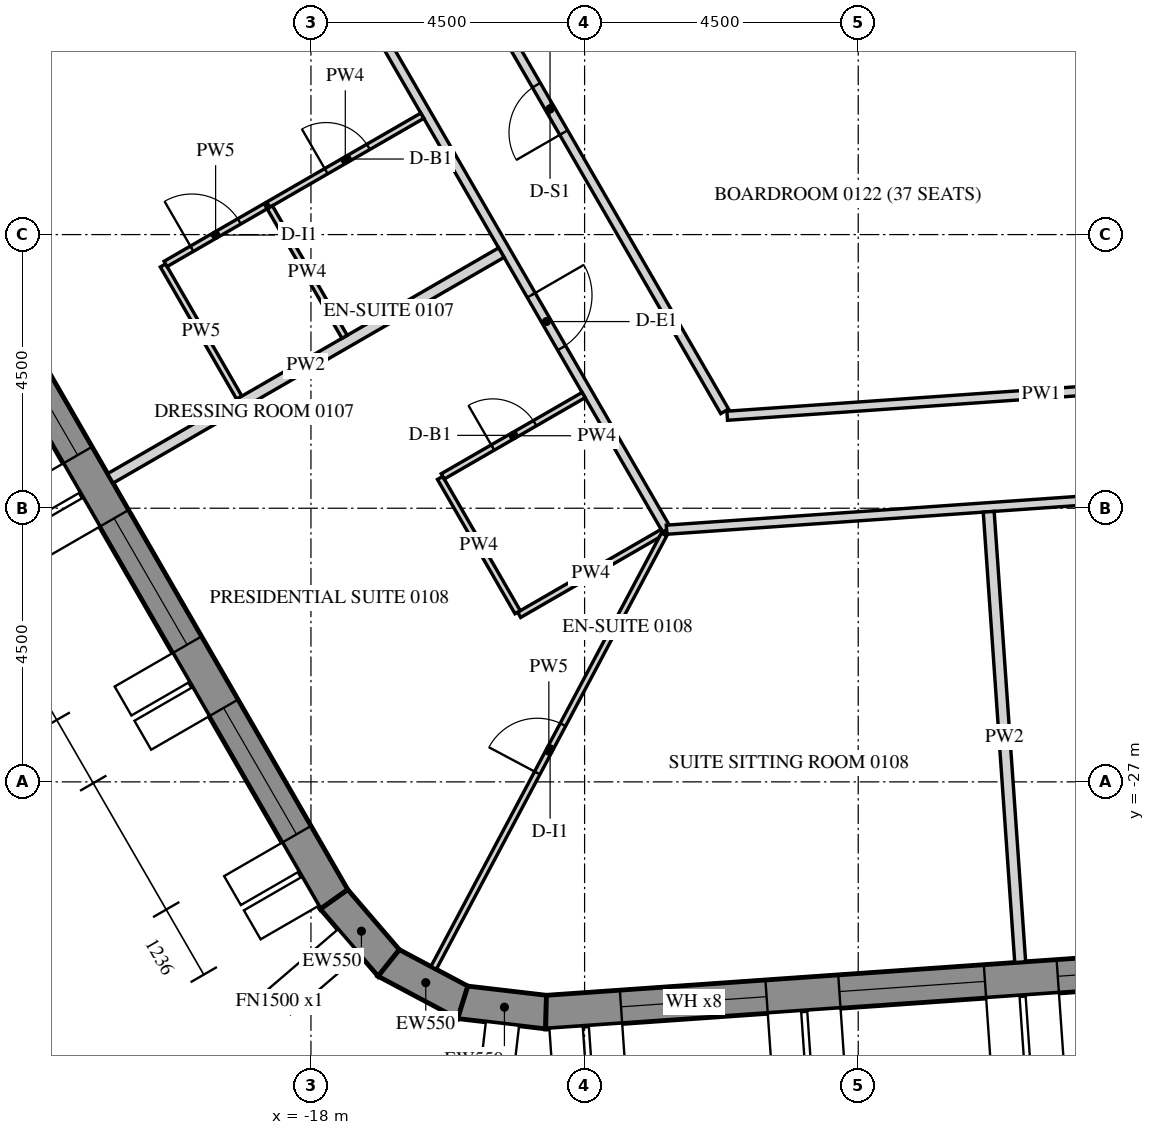
"""IFC4 building model, lengths in metres.
Left out: names, types, materials, properties, quantities, classifications, styles, units other than length and angle.
Written with IfcOpenShell. Run it as: python <this file> out.ifc"""

import sys

from ifc_helpers import new_model, si_unit, direction, frame, frame_2d, origin, place, context, subcontext, project, spatial, polyline, rectangle, outline, extrude, element, fill, save


model = new_model("IFC4")
c1 = context("Model", 3, precision=1e-05, world=origin(), true_north=direction((0.0, 1.0)))
c2 = subcontext(c1, "Body", "Model", "MODEL_VIEW")
j1 = project(units=[si_unit("LENGTHUNIT", "METRE"), si_unit("PLANEANGLEUNIT", "RADIAN")], contexts=[c1])
p1 = place(None, origin())
s1 = spatial("IfcSite", under=j1, at=p1, CompositionType="ELEMENT")
p2 = place(p1, origin())
s2 = spatial("IfcBuilding", under=s1, at=p2, CompositionType="ELEMENT")
p3 = place(p2, frame((0.0, 0.0, 37.5)))
s3 = spatial("IfcBuildingStorey", under=s2, at=p3, CompositionType="ELEMENT", Elevation=37.5)
p4 = place(p3, frame((-32.655, -2.89, -0.15), z_axis=(0.0, 0.0, 1.0), x_axis=(0.499997711317, -0.866026725152, 0.0)))
e1 = element("IfcWall", 1, at=p4, inside=s3, PredefinedType="SOLIDWALL", context=c2, shape_type="SweptSolid", body=[
    extrude(outline(polyline([(-0.022, -0.275), (30.097, -0.275), (30.045, 0.275), (0.022, 0.275), (-0.022, -0.275)])), origin(), (0.0, 0.0, 1.0), 3.9),
])
p5 = place(p4, frame((1.236, 0.0, 1.05)))
e2 = element("IfcOpeningElement", 2, at=p5, cuts=e1, PredefinedType="OPENING", context=c2, shape_type="SweptSolid", body=[
    extrude(rectangle(XDim=2.4, YDim=2.4, at=frame_2d((1.2, 1.2))), frame((0.0, 0.285, 0.0), z_axis=(0.0, -1.0, 0.0), x_axis=(1.0, 0.0, 0.0)), (0.0, 0.0, 1.0), 0.57),
])
p6 = place(p4, frame((4.835, 0.0, 1.05)))
e3 = element("IfcOpeningElement", 3, at=p6, cuts=e1, PredefinedType="OPENING", context=c2, shape_type="SweptSolid", body=[
    extrude(rectangle(XDim=2.4, YDim=2.4, at=frame_2d((1.2, 1.2))), frame((0.0, 0.285, 0.0), z_axis=(0.0, -1.0, 0.0), x_axis=(1.0, 0.0, 0.0)), (0.0, 0.0, 1.0), 0.57),
])
p7 = place(p4, frame((8.436, 0.0, 1.05)))
e4 = element("IfcOpeningElement", 4, at=p7, cuts=e1, PredefinedType="OPENING", context=c2, shape_type="SweptSolid", body=[
    extrude(rectangle(XDim=2.4, YDim=2.4, at=frame_2d((1.2, 1.2))), frame((0.0, 0.285, 0.0), z_axis=(0.0, -1.0, 0.0), x_axis=(1.0, 0.0, 0.0)), (0.0, 0.0, 1.0), 0.57),
])
p8 = place(p4, frame((12.035, 0.0, 1.05)))
e5 = element("IfcOpeningElement", 5, at=p8, cuts=e1, PredefinedType="OPENING", context=c2, shape_type="SweptSolid", body=[
    extrude(rectangle(XDim=2.4, YDim=2.4, at=frame_2d((1.2, 1.2))), frame((0.0, 0.285, 0.0), z_axis=(0.0, -1.0, 0.0), x_axis=(1.0, 0.0, 0.0)), (0.0, 0.0, 1.0), 0.57),
])
p9 = place(p4, frame((15.635, 0.0, 1.05)))
e6 = element("IfcOpeningElement", 6, at=p9, cuts=e1, PredefinedType="OPENING", context=c2, shape_type="SweptSolid", body=[
    extrude(rectangle(XDim=2.4, YDim=2.4, at=frame_2d((1.2, 1.2))), frame((0.0, 0.285, 0.0), z_axis=(0.0, -1.0, 0.0), x_axis=(1.0, 0.0, 0.0)), (0.0, 0.0, 1.0), 0.57),
])
p10 = place(p4, frame((19.236, 0.0, 1.05)))
e7 = element("IfcOpeningElement", 7, at=p10, cuts=e1, PredefinedType="OPENING", context=c2, shape_type="SweptSolid", body=[
    extrude(rectangle(XDim=2.4, YDim=2.4, at=frame_2d((1.2, 1.2))), frame((0.0, 0.285, 0.0), z_axis=(0.0, -1.0, 0.0), x_axis=(1.0, 0.0, 0.0)), (0.0, 0.0, 1.0), 0.57),
])
p11 = place(p4, frame((22.835, 0.0, 1.05)))
e8 = element("IfcOpeningElement", 8, at=p11, cuts=e1, PredefinedType="OPENING", context=c2, shape_type="SweptSolid", body=[
    extrude(rectangle(XDim=2.4, YDim=2.4, at=frame_2d((1.2, 1.2))), frame((0.0, 0.285, 0.0), z_axis=(0.0, -1.0, 0.0), x_axis=(1.0, 0.0, 0.0)), (0.0, 0.0, 1.0), 0.57),
])
p12 = place(p4, frame((26.436, 0.0, 1.05)))
e9 = element("IfcOpeningElement", 9, at=p12, cuts=e1, PredefinedType="OPENING", context=c2, shape_type="SweptSolid", body=[
    extrude(rectangle(XDim=2.4, YDim=2.4, at=frame_2d((1.2, 1.2))), frame((0.0, 0.285, 0.0), z_axis=(0.0, -1.0, 0.0), x_axis=(1.0, 0.0, 0.0)), (0.0, 0.0, 1.0), 0.57),
])
p13 = place(p3, frame((-17.619, -28.932, -0.15), z_axis=(0.0, 0.0, 1.0), x_axis=(0.651621950847, -0.758543890078, 0.0)))
e10 = element("IfcWall", 10, at=p13, inside=s3, PredefinedType="SOLIDWALL", context=c2, shape_type="SweptSolid", body=[
    extrude(outline(polyline([(-0.026, -0.275), (1.431, -0.275), (1.327, 0.275), (0.026, 0.275), (-0.026, -0.275)])), origin(), (0.0, 0.0, 1.0), 3.9),
])
p14 = place(p3, frame((-16.721, -29.979, -0.15), z_axis=(0.0, 0.0, 1.0), x_axis=(0.882994189209, -0.469383917304, 0.0)))
e11 = element("IfcWall", 11, at=p14, inside=s3, PredefinedType="SOLIDWALL", context=c2, shape_type="SweptSolid", body=[
    extrude(outline(polyline([(-0.052, -0.275), (1.431, -0.275), (1.327, 0.275), (0.052, 0.275), (-0.052, -0.275)])), origin(), (0.0, 0.0, 1.0), 3.9),
])
p15 = place(p3, frame((-15.503, -30.626, -0.15), z_axis=(0.0, 0.0, 1.0), x_axis=(0.993232537394, -0.11614269956, 0.0)))
e12 = element("IfcWall", 12, at=p15, inside=s3, PredefinedType="SOLIDWALL", context=c2, shape_type="SweptSolid", body=[
    extrude(outline(polyline([(-0.052, -0.275), (1.405, -0.275), (1.353, 0.275), (0.052, 0.275), (-0.052, -0.275)])), origin(), (0.0, 0.0, 1.0), 3.9),
])
p16 = place(p3, frame((-14.134, -30.786, -0.15), z_axis=(0.0, 0.0, 1.0), x_axis=(0.997564037441, 0.069756657061, 0.0)))
e13 = element("IfcWall", 13, at=p16, inside=s3, PredefinedType="SOLIDWALL", context=c2, shape_type="SweptSolid", body=[
    extrude(outline(polyline([(-0.026, -0.275), (30.094, -0.275), (30.049, 0.275), (0.026, 0.275), (-0.026, -0.275)])), origin(), (0.0, 0.0, 1.0), 3.9),
])
p17 = place(p16, frame((1.236, 0.0, 1.05)))
e14 = element("IfcOpeningElement", 14, at=p17, cuts=e13, PredefinedType="OPENING", context=c2, shape_type="SweptSolid", body=[
    extrude(rectangle(XDim=2.4, YDim=2.4, at=frame_2d((1.2, 1.2))), frame((0.0, 0.285, 0.0), z_axis=(0.0, -1.0, 0.0), x_axis=(1.0, 0.0, 0.0)), (0.0, 0.0, 1.0), 0.57),
])
p18 = place(p16, frame((4.835, 0.0, 1.05)))
e15 = element("IfcOpeningElement", 15, at=p18, cuts=e13, PredefinedType="OPENING", context=c2, shape_type="SweptSolid", body=[
    extrude(rectangle(XDim=2.4, YDim=2.4, at=frame_2d((1.2, 1.2))), frame((0.0, 0.285, 0.0), z_axis=(0.0, -1.0, 0.0), x_axis=(1.0, 0.0, 0.0)), (0.0, 0.0, 1.0), 0.57),
])
p19 = place(p16, frame((8.436, 0.0, 1.05)))
e16 = element("IfcOpeningElement", 16, at=p19, cuts=e13, PredefinedType="OPENING", context=c2, shape_type="SweptSolid", body=[
    extrude(rectangle(XDim=2.4, YDim=2.4, at=frame_2d((1.2, 1.2))), frame((0.0, 0.285, 0.0), z_axis=(0.0, -1.0, 0.0), x_axis=(1.0, 0.0, 0.0)), (0.0, 0.0, 1.0), 0.57),
])
p20 = place(p16, frame((12.035, 0.0, 1.05)))
e17 = element("IfcOpeningElement", 17, at=p20, cuts=e13, PredefinedType="OPENING", context=c2, shape_type="SweptSolid", body=[
    extrude(rectangle(XDim=2.4, YDim=2.4, at=frame_2d((1.2, 1.2))), frame((0.0, 0.285, 0.0), z_axis=(0.0, -1.0, 0.0), x_axis=(1.0, 0.0, 0.0)), (0.0, 0.0, 1.0), 0.57),
])
p21 = place(p16, frame((15.635, 0.0, 1.05)))
e18 = element("IfcOpeningElement", 18, at=p21, cuts=e13, PredefinedType="OPENING", context=c2, shape_type="SweptSolid", body=[
    extrude(rectangle(XDim=2.4, YDim=2.4, at=frame_2d((1.2, 1.2))), frame((0.0, 0.285, 0.0), z_axis=(0.0, -1.0, 0.0), x_axis=(1.0, 0.0, 0.0)), (0.0, 0.0, 1.0), 0.57),
])
p22 = place(p16, frame((19.236, 0.0, 1.05)))
e19 = element("IfcOpeningElement", 19, at=p22, cuts=e13, PredefinedType="OPENING", context=c2, shape_type="SweptSolid", body=[
    extrude(rectangle(XDim=2.4, YDim=2.4, at=frame_2d((1.2, 1.2))), frame((0.0, 0.285, 0.0), z_axis=(0.0, -1.0, 0.0), x_axis=(1.0, 0.0, 0.0)), (0.0, 0.0, 1.0), 0.57),
])
p23 = place(p16, frame((22.835, 0.0, 1.05)))
e20 = element("IfcOpeningElement", 20, at=p23, cuts=e13, PredefinedType="OPENING", context=c2, shape_type="SweptSolid", body=[
    extrude(rectangle(XDim=2.4, YDim=2.4, at=frame_2d((1.2, 1.2))), frame((0.0, 0.285, 0.0), z_axis=(0.0, -1.0, 0.0), x_axis=(1.0, 0.0, 0.0)), (0.0, 0.0, 1.0), 0.57),
])
p24 = place(p16, frame((26.436, 0.0, 1.05)))
e21 = element("IfcOpeningElement", 21, at=p24, cuts=e13, PredefinedType="OPENING", context=c2, shape_type="SweptSolid", body=[
    extrude(rectangle(XDim=2.4, YDim=2.4, at=frame_2d((1.2, 1.2))), frame((0.0, 0.285, 0.0), z_axis=(0.0, -1.0, 0.0), x_axis=(1.0, 0.0, 0.0)), (0.0, 0.0, 1.0), 0.57),
])
p25 = place(p3, frame((-24.09, -2.175, 0.0), z_axis=(0.0, 0.0, 1.0), x_axis=(0.499996832073, -0.86602723278, 0.0)))
e22 = element("IfcWall", 22, at=p25, inside=s3, PredefinedType="PARTITIONING", context=c2, shape_type="SweptSolid", body=[
    extrude(rectangle(XDim=23.877, YDim=0.15, at=frame_2d((11.938, 0.0))), origin(), (0.0, 0.0, 1.0), 2.988),
])
p26 = place(p25, frame((4.543, 0.0, 0.0)))
e23 = element("IfcOpeningElement", 23, at=p26, cuts=e22, PredefinedType="OPENING", context=c2, shape_type="SweptSolid", body=[
    extrude(rectangle(XDim=1.0, YDim=2.1, at=frame_2d((0.5, 1.05))), frame((0.0, 0.085, 0.0), z_axis=(0.0, -1.0, 0.0), x_axis=(1.0, 0.0, 0.0)), (0.0, 0.0, 1.0), 0.17),
])
p27 = place(p25, frame((11.372, 0.0, 0.0)))
e24 = element("IfcOpeningElement", 24, at=p27, cuts=e22, PredefinedType="OPENING", context=c2, shape_type="SweptSolid", body=[
    extrude(rectangle(XDim=1.0, YDim=2.1, at=frame_2d((0.5, 1.05))), frame((0.0, 0.085, 0.0), z_axis=(0.0, -1.0, 0.0), x_axis=(1.0, 0.0, 0.0)), (0.0, 0.0, 1.0), 0.17),
])
p28 = place(p25, frame((19.425, 0.0, 0.0)))
e25 = element("IfcOpeningElement", 25, at=p28, cuts=e22, PredefinedType="OPENING", context=c2, shape_type="SweptSolid", body=[
    extrude(rectangle(XDim=1.0, YDim=2.1, at=frame_2d((0.5, 1.05))), frame((0.0, 0.085, 0.0), z_axis=(0.0, -1.0, 0.0), x_axis=(1.0, 0.0, 0.0)), (0.0, 0.0, 1.0), 0.17),
])
p29 = place(p3, frame((-12.151, -22.853, 0.0), z_axis=(0.0, 0.0, 1.0), x_axis=(0.99756425444, 0.069753553767, 0.0)))
e26 = element("IfcWall", 26, at=p29, inside=s3, PredefinedType="PARTITIONING", context=c2, shape_type="SweptSolid", body=[
    extrude(rectangle(XDim=22.085, YDim=0.15, at=frame_2d((11.042, 0.0))), origin(), (0.0, 0.0, 1.0), 2.988),
])
p30 = place(p29, frame((8.905, 0.0, 0.0)))
e27 = element("IfcOpeningElement", 27, at=p30, cuts=e26, PredefinedType="OPENING", context=c2, shape_type="SweptSolid", body=[
    extrude(rectangle(XDim=1.0, YDim=2.1, at=frame_2d((0.5, 1.05))), frame((0.0, 0.085, 0.0), z_axis=(0.0, -1.0, 0.0), x_axis=(1.0, 0.0, 0.0)), (0.0, 0.0, 1.0), 0.17),
])
p31 = place(p29, frame((19.795, 0.0, 0.0)))
e28 = element("IfcOpeningElement", 28, at=p31, cuts=e26, PredefinedType="OPENING", context=c2, shape_type="SweptSolid", body=[
    extrude(rectangle(XDim=1.0, YDim=2.1, at=frame_2d((0.5, 1.05))), frame((0.0, 0.085, 0.0), z_axis=(0.0, -1.0, 0.0), x_axis=(1.0, 0.0, 0.0)), (0.0, 0.0, 1.0), 0.17),
])
p32 = place(p3, frame((-0.825, -20.257, 0.0), z_axis=(0.0, 0.0, 1.0), x_axis=(-0.9975635143, -0.069764137903, 0.0)))
e29 = element("IfcWall", 29, at=p32, inside=s3, PredefinedType="PARTITIONING", context=c2, shape_type="SweptSolid", body=[
    extrude(rectangle(XDim=10.355, YDim=0.15, at=frame_2d((5.177, 0.0))), origin(), (0.0, 0.0, 1.0), 2.988),
])
p33 = place(p3, frame((-11.197, -20.907, 0.0), z_axis=(0.0, 0.0, 1.0), x_axis=(-0.500004557924, 0.86602277225, 0.0)))
e30 = element("IfcWall", 30, at=p33, inside=s3, PredefinedType="PARTITIONING", context=c2, shape_type="SweptSolid", body=[
    extrude(rectangle(XDim=11.487, YDim=0.15, at=frame_2d((5.743, 0.0))), origin(), (0.0, 0.0, 1.0), 2.988),
])
p34 = place(p33, frame((5.293, 0.0, 0.0)))
e31 = element("IfcOpeningElement", 31, at=p34, cuts=e30, PredefinedType="OPENING", context=c2, shape_type="SweptSolid", body=[
    extrude(rectangle(XDim=0.9, YDim=2.1, at=frame_2d((0.45, 1.05))), frame((0.0, 0.085, 0.0), z_axis=(0.0, -1.0, 0.0), x_axis=(1.0, 0.0, 0.0)), (0.0, 0.0, 1.0), 0.17),
])
p35 = place(p3, frame((-18.702, -17.508, 0.0), z_axis=(0.0, 0.0, 1.0), x_axis=(0.86601045545, 0.500025890382, 0.0)))
e32 = element("IfcWall", 32, at=p35, inside=s3, PredefinedType="PARTITIONING", context=c2, shape_type="SweptSolid", body=[
    extrude(rectangle(XDim=2.925, YDim=0.1, at=frame_2d((1.462, 0.0))), origin(), (0.0, 0.0, 1.0), 2.988),
])
p36 = place(p35, frame((1.1, 0.0, 0.0)))
e33 = element("IfcOpeningElement", 33, at=p36, cuts=e32, PredefinedType="OPENING", context=c2, shape_type="SweptSolid", body=[
    extrude(rectangle(XDim=0.8, YDim=2.1, at=frame_2d((0.4, 1.05))), frame((0.0, 0.06, 0.0), z_axis=(0.0, -1.0, 0.0), x_axis=(1.0, 0.0, 0.0)), (0.0, 0.0, 1.0), 0.12),
])
p37 = place(p3, frame((-19.179, -20.681, 0.0), z_axis=(0.0, 0.0, 1.0), x_axis=(-0.499989096993, 0.866031698547, 0.0)))
e34 = element("IfcWall", 34, at=p37, inside=s3, PredefinedType="PARTITIONING", context=c2, shape_type="SweptSolid", body=[
    extrude(rectangle(XDim=2.51, YDim=0.1, at=frame_2d((1.255, 0.0))), origin(), (0.0, 0.0, 1.0), 2.988),
])
p38 = place(p3, frame((-20.391, -18.482, 0.0), z_axis=(0.0, 0.0, 1.0), x_axis=(0.866044365799, 0.499967155389, 0.0)))
e35 = element("IfcWall", 35, at=p38, inside=s3, PredefinedType="PARTITIONING", context=c2, shape_type="SweptSolid", body=[
    extrude(rectangle(XDim=1.9, YDim=0.1, at=frame_2d((0.95, 0.0))), origin(), (0.0, 0.0, 1.0), 2.988),
])
p39 = place(p38, frame((0.5, 0.0, 0.0)))
e36 = element("IfcOpeningElement", 36, at=p39, cuts=e35, PredefinedType="OPENING", context=c2, shape_type="SweptSolid", body=[
    extrude(rectangle(XDim=0.9, YDim=2.1, at=frame_2d((0.45, 1.05))), frame((0.0, 0.06, 0.0), z_axis=(0.0, -1.0, 0.0), x_axis=(1.0, 0.0, 0.0)), (0.0, 0.0, 1.0), 0.12),
])
p40 = place(p3, frame((-21.299, -22.009, 0.0), z_axis=(0.0, 0.0, 1.0), x_axis=(0.866014745021, 0.500018461065, 0.0)))
e37 = element("IfcWall", 37, at=p40, inside=s3, PredefinedType="PARTITIONING", context=c2, shape_type="SweptSolid", body=[
    extrude(rectangle(XDim=7.425, YDim=0.18, at=frame_2d((3.712, 0.0))), origin(), (0.0, 0.0, 1.0), 2.988),
])
p41 = place(p3, frame((-18.677, -17.551, 0.0), z_axis=(0.0, 0.0, 1.0), x_axis=(0.500003092839, -0.866023618125, 0.0)))
e38 = element("IfcWall", 38, at=p41, inside=s3, PredefinedType="PARTITIONING", context=c2, shape_type="SweptSolid", body=[
    extrude(rectangle(XDim=2.46, YDim=0.1, at=frame_2d((1.23, 0.0))), origin(), (0.0, 0.0, 1.0), 2.988),
])
p42 = place(p3, frame((-12.216, -22.891, 0.0), z_axis=(0.0, 0.0, 1.0), x_axis=(-0.866012511928, -0.500022328685, 0.0)))
e39 = element("IfcWall", 39, at=p42, inside=s3, PredefinedType="PARTITIONING", context=c2, shape_type="SweptSolid", body=[
    extrude(rectangle(XDim=2.725, YDim=0.1, at=frame_2d((1.363, 0.0))), origin(), (0.0, 0.0, 1.0), 2.988),
])
p43 = place(p3, frame((-14.601, -24.21, 0.0), z_axis=(0.0, 0.0, 1.0), x_axis=(-0.500062241894, 0.865989465428, 0.0)))
e40 = element("IfcWall", 40, at=p43, inside=s3, PredefinedType="PARTITIONING", context=c2, shape_type="SweptSolid", body=[
    extrude(rectangle(XDim=2.55, YDim=0.1, at=frame_2d((1.275, 0.0))), origin(), (0.0, 0.0, 1.0), 2.988),
])
p44 = place(p3, frame((-15.833, -21.977, 0.0), z_axis=(0.0, 0.0, 1.0), x_axis=(0.86604424267, 0.499967368674, 0.0)))
e41 = element("IfcWall", 41, at=p44, inside=s3, PredefinedType="PARTITIONING", context=c2, shape_type="SweptSolid", body=[
    extrude(rectangle(XDim=2.675, YDim=0.1, at=frame_2d((1.337, 0.0))), origin(), (0.0, 0.0, 1.0), 2.988),
])
p45 = place(p44, frame((0.95, 0.0, 0.0)))
e42 = element("IfcOpeningElement", 42, at=p45, cuts=e41, PredefinedType="OPENING", context=c2, shape_type="SweptSolid", body=[
    extrude(rectangle(XDim=0.8, YDim=2.1, at=frame_2d((0.4, 1.05))), frame((0.0, 0.06, 0.0), z_axis=(0.0, -1.0, 0.0), x_axis=(1.0, 0.0, 0.0)), (0.0, 0.0, 1.0), 0.12),
])
p46 = place(p3, frame((-15.983, -30.059, 0.0), z_axis=(0.0, 0.0, 1.0), x_axis=(0.469476547643, 0.882944942346, 0.0)))
e43 = element("IfcWall", 43, at=p46, inside=s3, PredefinedType="PARTITIONING", context=c2, shape_type="SweptSolid", body=[
    extrude(rectangle(XDim=8.073, YDim=0.1, at=frame_2d((4.037, 0.0))), origin(), (0.0, 0.0, 1.0), 2.988),
])
p47 = place(p46, frame((3.631, 0.0, 0.0)))
e44 = element("IfcOpeningElement", 44, at=p47, cuts=e43, PredefinedType="OPENING", context=c2, shape_type="SweptSolid", body=[
    extrude(rectangle(XDim=0.9, YDim=2.1, at=frame_2d((0.45, 1.05))), frame((0.0, 0.06, 0.0), z_axis=(0.0, -1.0, 0.0), x_axis=(1.0, 0.0, 0.0)), (0.0, 0.0, 1.0), 0.12),
])
p48 = place(p3, frame((-6.336, -29.965, 0.0), z_axis=(0.0, 0.0, 1.0), x_axis=(-0.06977252161, 0.997562927954, 0.0)))
e45 = element("IfcWall", 45, at=p48, inside=s3, PredefinedType="PARTITIONING", context=c2, shape_type="SweptSolid", body=[
    extrude(rectangle(XDim=7.425, YDim=0.18, at=frame_2d((3.712, 0.0))), origin(), (0.0, 0.0, 1.0), 2.988),
])
p49 = place(p10, frame((0.0, 0.205, 0.0)))
e46 = element("IfcWindow", 46, at=p49, inside=s3, PartitioningType="DOUBLE_PANEL_VERTICAL", PredefinedType="WINDOW", context=c2, shape_type="SweptSolid", body=[
    extrude(rectangle(XDim=2.4, YDim=2.4, at=frame_2d((1.2, 1.2))), frame((0.0, 0.03, 0.0), z_axis=(0.0, -1.0, 0.0), x_axis=(1.0, 0.0, 0.0)), (0.0, 0.0, 1.0), 0.06),
])
fill(e7, e46)
p50 = place(p11, frame((0.0, 0.205, 0.0)))
e47 = element("IfcWindow", 47, at=p50, inside=s3, PartitioningType="DOUBLE_PANEL_VERTICAL", PredefinedType="WINDOW", context=c2, shape_type="SweptSolid", body=[
    extrude(rectangle(XDim=2.4, YDim=2.4, at=frame_2d((1.2, 1.2))), frame((0.0, 0.03, 0.0), z_axis=(0.0, -1.0, 0.0), x_axis=(1.0, 0.0, 0.0)), (0.0, 0.0, 1.0), 0.06),
])
fill(e8, e47)
p51 = place(p12, frame((0.0, 0.205, 0.0)))
e48 = element("IfcWindow", 48, at=p51, inside=s3, PartitioningType="DOUBLE_PANEL_VERTICAL", PredefinedType="WINDOW", context=c2, shape_type="SweptSolid", body=[
    extrude(rectangle(XDim=2.4, YDim=2.4, at=frame_2d((1.2, 1.2))), frame((0.0, 0.03, 0.0), z_axis=(0.0, -1.0, 0.0), x_axis=(1.0, 0.0, 0.0)), (0.0, 0.0, 1.0), 0.06),
])
fill(e9, e48)
p52 = place(p17, frame((0.0, 0.205, 0.0)))
e49 = element("IfcWindow", 49, at=p52, inside=s3, PartitioningType="DOUBLE_PANEL_VERTICAL", PredefinedType="WINDOW", context=c2, shape_type="SweptSolid", body=[
    extrude(rectangle(XDim=2.4, YDim=2.4, at=frame_2d((1.2, 1.2))), frame((0.0, 0.03, 0.0), z_axis=(0.0, -1.0, 0.0), x_axis=(1.0, 0.0, 0.0)), (0.0, 0.0, 1.0), 0.06),
])
fill(e14, e49)
p53 = place(p18, frame((0.0, 0.205, 0.0)))
e50 = element("IfcWindow", 50, at=p53, inside=s3, PartitioningType="DOUBLE_PANEL_VERTICAL", PredefinedType="WINDOW", context=c2, shape_type="SweptSolid", body=[
    extrude(rectangle(XDim=2.4, YDim=2.4, at=frame_2d((1.2, 1.2))), frame((0.0, 0.03, 0.0), z_axis=(0.0, -1.0, 0.0), x_axis=(1.0, 0.0, 0.0)), (0.0, 0.0, 1.0), 0.06),
])
fill(e15, e50)
p54 = place(p19, frame((0.0, 0.205, 0.0)))
e51 = element("IfcWindow", 51, at=p54, inside=s3, PartitioningType="DOUBLE_PANEL_VERTICAL", PredefinedType="WINDOW", context=c2, shape_type="SweptSolid", body=[
    extrude(rectangle(XDim=2.4, YDim=2.4, at=frame_2d((1.2, 1.2))), frame((0.0, 0.03, 0.0), z_axis=(0.0, -1.0, 0.0), x_axis=(1.0, 0.0, 0.0)), (0.0, 0.0, 1.0), 0.06),
])
fill(e16, e51)
p55 = place(p36, origin())
e52 = element("IfcDoor", 52, at=p55, inside=s3, OperationType="SINGLE_SWING_LEFT", PredefinedType="DOOR", context=c2, shape_type="SweptSolid", body=[
    extrude(rectangle(XDim=0.8, YDim=2.1, at=frame_2d((0.4, 1.05))), frame((0.0, 0.025, 0.0), z_axis=(0.0, -1.0, 0.0), x_axis=(1.0, 0.0, 0.0)), (0.0, 0.0, 1.0), 0.05),
])
fill(e33, e52)
p56 = place(p39, origin())
e53 = element("IfcDoor", 53, at=p56, inside=s3, OperationType="SINGLE_SWING_RIGHT", PredefinedType="DOOR", context=c2, shape_type="SweptSolid", body=[
    extrude(rectangle(XDim=0.9, YDim=2.1, at=frame_2d((0.45, 1.05))), frame((0.0, 0.025, 0.0), z_axis=(0.0, -1.0, 0.0), x_axis=(1.0, 0.0, 0.0)), (0.0, 0.0, 1.0), 0.05),
])
fill(e36, e53)
p57 = place(p28, origin())
e54 = element("IfcDoor", 54, at=p57, inside=s3, OperationType="SINGLE_SWING_RIGHT", PredefinedType="DOOR", context=c2, shape_type="SweptSolid", body=[
    extrude(rectangle(XDim=1.0, YDim=2.1, at=frame_2d((0.5, 1.05))), frame((0.0, 0.025, 0.0), z_axis=(0.0, -1.0, 0.0), x_axis=(1.0, 0.0, 0.0)), (0.0, 0.0, 1.0), 0.05),
])
fill(e25, e54)
p58 = place(p45, origin())
e55 = element("IfcDoor", 55, at=p58, inside=s3, OperationType="SINGLE_SWING_LEFT", PredefinedType="DOOR", context=c2, shape_type="SweptSolid", body=[
    extrude(rectangle(XDim=0.8, YDim=2.1, at=frame_2d((0.4, 1.05))), frame((0.0, 0.025, 0.0), z_axis=(0.0, -1.0, 0.0), x_axis=(1.0, 0.0, 0.0)), (0.0, 0.0, 1.0), 0.05),
])
fill(e42, e55)
p59 = place(p47, origin())
e56 = element("IfcDoor", 56, at=p59, inside=s3, OperationType="SINGLE_SWING_LEFT", PredefinedType="DOOR", context=c2, shape_type="SweptSolid", body=[
    extrude(rectangle(XDim=0.9, YDim=2.1, at=frame_2d((0.45, 1.05))), frame((0.0, 0.025, 0.0), z_axis=(0.0, -1.0, 0.0), x_axis=(1.0, 0.0, 0.0)), (0.0, 0.0, 1.0), 0.05),
])
fill(e44, e56)
p60 = place(p34, origin())
e57 = element("IfcDoor", 57, at=p60, inside=s3, OperationType="SINGLE_SWING_RIGHT", PredefinedType="DOOR", context=c2, shape_type="SweptSolid", body=[
    extrude(rectangle(XDim=0.9, YDim=2.1, at=frame_2d((0.45, 1.05))), frame((0.0, 0.025, 0.0), z_axis=(0.0, -1.0, 0.0), x_axis=(1.0, 0.0, 0.0)), (0.0, 0.0, 1.0), 0.05),
])
fill(e31, e57)
save(model, sys.argv[1])
